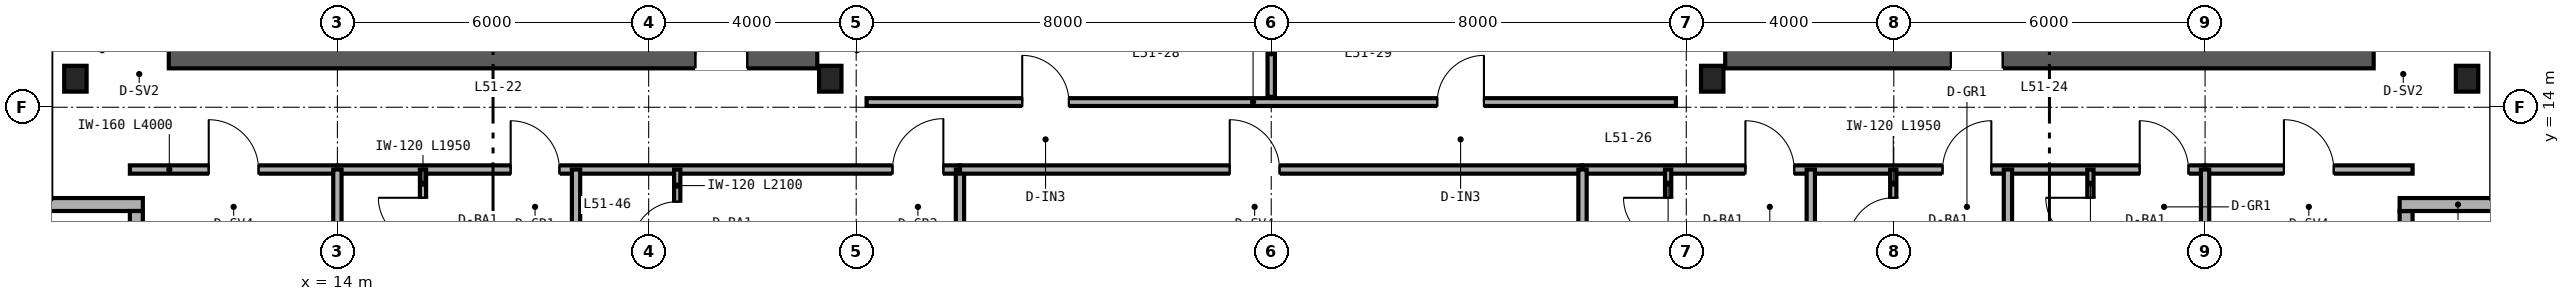
"""IFC4 building model, lengths in metres.
Left out: names, types, materials, properties, quantities, classifications, styles, units other than length and angle.
Written with IfcOpenShell. Run it as: python <this file> out.ifc"""

import sys

from ifc_helpers import new_model, si_unit, direction, frame, frame_2d, origin, origin_2d, place, context, subcontext, project, spatial, rectangle, i_section, extrude, source, transform, mapped, element, fill, save


model = new_model("IFC4")
c1 = context("Model", 3, precision=1e-05, world=origin(), true_north=direction((0.0, 1.0)))
c2 = subcontext(c1, "Body", "Model", "MODEL_VIEW")
j1 = project(units=[si_unit("LENGTHUNIT", "METRE"), si_unit("PLANEANGLEUNIT", "RADIAN")], contexts=[c1])
p1 = place(None, origin())
s1 = spatial("IfcSite", under=j1, at=p1, CompositionType="ELEMENT")
p2 = place(p1, origin())
s2 = spatial("IfcBuilding", under=s1, at=p2, CompositionType="ELEMENT")
p3 = place(p2, frame((0.0, 0.0, 202.8)))
s3 = spatial("IfcBuildingStorey", under=s2, at=p3, CompositionType="ELEMENT", Elevation=202.8)
p4 = place(p3, frame((10.75, 15.0, 0.0), z_axis=(0.0, 0.0, 1.0), x_axis=(1.0, 0.0, 0.0)))
e1 = element("IfcWall", 1, at=p4, inside=s3, PredefinedType="SHEAR", context=c2, shape_type="SweptSolid", body=[
    extrude(rectangle(XDim=12.5, YDim=0.5, at=frame_2d((6.25, 0.0))), origin(), (0.0, 0.0, 1.0), 3.37),
])
p5 = place(p4, frame((10.15, 0.0, 0.0)))
e2 = element("IfcOpeningElement", 2, at=p5, cuts=e1, PredefinedType="OPENING", context=c2, shape_type="SweptSolid", body=[
    extrude(rectangle(XDim=1.0, YDim=2.15, at=frame_2d((0.5, 1.075))), frame((0.0, 0.26, 0.0), z_axis=(0.0, -1.0, 0.0), x_axis=(1.0, 0.0, 0.0)), (0.0, 0.0, 1.0), 0.52),
])
p6 = place(p3, frame((40.75, 15.0, 0.0), z_axis=(0.0, 0.0, 1.0), x_axis=(1.0, 0.0, 0.0)))
e3 = element("IfcWall", 3, at=p6, inside=s3, PredefinedType="SHEAR", context=c2, shape_type="SweptSolid", body=[
    extrude(rectangle(XDim=12.5, YDim=0.5, at=frame_2d((6.25, 0.0))), origin(), (0.0, 0.0, 1.0), 3.37),
])
p7 = place(p6, frame((4.35, 0.0, 0.0)))
e4 = element("IfcOpeningElement", 4, at=p7, cuts=e3, PredefinedType="OPENING", context=c2, shape_type="SweptSolid", body=[
    extrude(rectangle(XDim=1.0, YDim=2.15, at=frame_2d((0.5, 1.075))), frame((0.0, 0.26, 0.0), z_axis=(0.0, -1.0, 0.0), x_axis=(1.0, 0.0, 0.0)), (0.0, 0.0, 1.0), 0.52),
])
m1 = source(origin(), c2, "Body", "SweptSolid", [
    extrude(i_section(OverallWidth=0.432, OverallDepth=0.498, WebThickness=0.056, FlangeThickness=0.089, FilletRadius=0.025, at=origin_2d()), origin(), (0.0, 0.0, 1.0), 3.37),
])
for number, where, z_axis, x_axis in (
    (5, (8.95, 14.55, 0.0), (0.0, 0.0, 1.0), (1.0, 0.0, 0.0)),
    (6, (23.5, 14.55, 0.0), (0.0, 0.0, 1.0), (1.0, 0.0, 0.0)),
    (7, (40.5, 14.55, 0.0), (0.0, 0.0, 1.0), (1.0, 0.0, 0.0)),
    (8, (55.05, 14.55, 0.0), (0.0, 0.0, 1.0), (1.0, 0.0, 0.0)),
):
    element("IfcColumn", number, at=place(p3, frame(where, z_axis=z_axis, x_axis=x_axis)), inside=s3, PredefinedType="COLUMN", context=c2, shape_type="MappedRepresentation", body=[
        mapped(m1, transform((0.0, 0.0, 0.0), scale=1.0)),
    ])
p8 = place(p3, frame((53.875, 10.0, 0.0), z_axis=(0.0, 0.0, 1.0), x_axis=(0.0, 1.0, 0.0)))
e9 = element("IfcWall", 9, at=p8, inside=s3, PredefinedType="SOLIDWALL", context=c2, shape_type="SweptSolid", body=[
    extrude(rectangle(XDim=2.0, YDim=0.25, at=frame_2d((1.0, 0.0))), origin(), (0.0, 0.0, 1.0), 3.37),
])
for number, where, z_axis, x_axis in (
    (10, (53.75, 12.125, 0.0), (0.0, 0.0, 1.0), (1.0, 0.0, 0.0)),
    (11, (8.0, 12.125, 0.0), (0.0, 0.0, 1.0), (1.0, 0.0, 0.0)),
):
    element("IfcWall", number, at=place(p3, frame(where, z_axis=z_axis, x_axis=x_axis)), inside=s3, PredefinedType="SOLIDWALL", context=c2, shape_type="SweptSolid", body=[
        extrude(rectangle(XDim=2.25, YDim=0.25, at=frame_2d((1.125, 0.0))), origin(), (0.0, 0.0, 1.0), 3.37),
    ])
p9 = place(p3, frame((10.125, 12.0, 0.0), z_axis=(0.0, 0.0, 1.0), x_axis=(0.0, -1.0, 0.0)))
e12 = element("IfcWall", 12, at=p9, inside=s3, PredefinedType="SOLIDWALL", context=c2, shape_type="SweptSolid", body=[
    extrude(rectangle(XDim=2.0, YDim=0.25, at=frame_2d((1.0, 0.0))), origin(), (0.0, 0.0, 1.0), 3.37),
])
p10 = place(p3, frame((24.2, 14.1, 0.0), z_axis=(0.0, 0.0, 1.0), x_axis=(1.0, 0.0, 0.0)))
e13 = element("IfcWall", 13, at=p10, inside=s3, PredefinedType="PARTITIONING", context=c2, shape_type="SweptSolid", body=[
    extrude(rectangle(XDim=15.6, YDim=0.15, at=frame_2d((7.8, 0.0))), origin(), (0.0, 0.0, 1.0), 3.37),
])
p11 = place(p10, frame((3.0, 0.0, 0.0)))
e14 = element("IfcOpeningElement", 14, at=p11, cuts=e13, PredefinedType="OPENING", context=c2, shape_type="SweptSolid", body=[
    extrude(rectangle(XDim=0.9, YDim=2.15, at=frame_2d((0.45, 1.075))), frame((0.0, 0.085, 0.0), z_axis=(0.0, -1.0, 0.0), x_axis=(1.0, 0.0, 0.0)), (0.0, 0.0, 1.0), 0.17),
])
p12 = place(p10, frame((11.0, 0.0, 0.0)))
e15 = element("IfcOpeningElement", 15, at=p12, cuts=e13, PredefinedType="OPENING", context=c2, shape_type="SweptSolid", body=[
    extrude(rectangle(XDim=0.9, YDim=2.15, at=frame_2d((0.45, 1.075))), frame((0.0, 0.085, 0.0), z_axis=(0.0, -1.0, 0.0), x_axis=(1.0, 0.0, 0.0)), (0.0, 0.0, 1.0), 0.17),
])
p13 = place(p3, frame((32.0, 14.2, 0.0), z_axis=(0.0, 0.0, 1.0), x_axis=(0.0, 1.0, 0.0)))
e16 = element("IfcWall", 16, at=p13, inside=s3, PredefinedType="PARTITIONING", context=c2, shape_type="SweptSolid", body=[
    extrude(rectangle(XDim=1.68, YDim=0.142, at=frame_2d((0.84, 0.0))), origin(), (0.0, 0.0, 1.0), 3.37),
])
p14 = place(p3, frame((10.0, 12.8, 0.0), z_axis=(0.0, 0.0, 1.0), x_axis=(1.0, 0.0, 0.0)))
e17 = element("IfcWall", 17, at=p14, inside=s3, PredefinedType="PARTITIONING", context=c2, shape_type="SweptSolid", body=[
    extrude(rectangle(XDim=4.0, YDim=0.16, at=frame_2d((2.0, 0.0))), origin(), (0.0, 0.0, 1.0), 3.37),
])
p15 = place(p14, frame((1.52, 0.0, 0.0)))
e18 = element("IfcOpeningElement", 18, at=p15, cuts=e17, PredefinedType="OPENING", context=c2, shape_type="SweptSolid", body=[
    extrude(rectangle(XDim=0.96, YDim=2.15, at=frame_2d((0.48, 1.075))), frame((0.0, 0.09, 0.0), z_axis=(0.0, -1.0, 0.0), x_axis=(1.0, 0.0, 0.0)), (0.0, 0.0, 1.0), 0.18),
])
p16 = place(p3, frame((50.0, 12.8, 0.0), z_axis=(0.0, 0.0, 1.0), x_axis=(1.0, 0.0, 0.0)))
e19 = element("IfcWall", 19, at=p16, inside=s3, PredefinedType="PARTITIONING", context=c2, shape_type="SweptSolid", body=[
    extrude(rectangle(XDim=4.0, YDim=0.16, at=frame_2d((2.0, 0.0))), origin(), (0.0, 0.0, 1.0), 3.37),
])
p17 = place(p16, frame((1.52, 0.0, 0.0)))
e20 = element("IfcOpeningElement", 20, at=p17, cuts=e19, PredefinedType="OPENING", context=c2, shape_type="SweptSolid", body=[
    extrude(rectangle(XDim=0.96, YDim=2.15, at=frame_2d((0.48, 1.075))), frame((0.0, 0.09, 0.0), z_axis=(0.0, -1.0, 0.0), x_axis=(1.0, 0.0, 0.0)), (0.0, 0.0, 1.0), 0.18),
])
p18 = place(p3, frame((14.0, 12.8, 0.0), z_axis=(0.0, 0.0, 1.0), x_axis=(1.0, 0.0, 0.0)))
e21 = element("IfcWall", 21, at=p18, inside=s3, PredefinedType="PARTITIONING", context=c2, shape_type="SweptSolid", body=[
    extrude(rectangle(XDim=12.0, YDim=0.16, at=frame_2d((6.0, 0.0))), origin(), (0.0, 0.0, 1.0), 2.913),
])
p19 = place(p18, frame((3.34, 0.0, 0.0)))
e22 = element("IfcOpeningElement", 22, at=p19, cuts=e21, PredefinedType="OPENING", context=c2, shape_type="SweptSolid", body=[
    extrude(rectangle(XDim=0.94, YDim=2.15, at=frame_2d((0.47, 1.075))), frame((0.0, 0.09, 0.0), z_axis=(0.0, -1.0, 0.0), x_axis=(1.0, 0.0, 0.0)), (0.0, 0.0, 1.0), 0.18),
])
p20 = place(p18, frame((10.7, 0.0, 0.0)))
e23 = element("IfcOpeningElement", 23, at=p20, cuts=e21, PredefinedType="OPENING", context=c2, shape_type="SweptSolid", body=[
    extrude(rectangle(XDim=0.98, YDim=2.2, at=frame_2d((0.49, 1.1))), frame((0.0, 0.09, 0.0), z_axis=(0.0, -1.0, 0.0), x_axis=(1.0, 0.0, 0.0)), (0.0, 0.0, 1.0), 0.18),
])
p21 = place(p3, frame((14.0, 6.36, 0.0), z_axis=(0.0, 0.0, 1.0), x_axis=(0.0, 1.0, 0.0)))
e24 = element("IfcWall", 24, at=p21, inside=s3, PredefinedType="PARTITIONING", context=c2, shape_type="SweptSolid", body=[
    extrude(rectangle(XDim=6.44, YDim=0.16, at=frame_2d((3.22, 0.0))), origin(), (0.0, 0.0, 1.0), 2.677),
])
p22 = place(p3, frame((26.0, 6.36, 0.0), z_axis=(0.0, 0.0, 1.0), x_axis=(0.0, 1.0, 0.0)))
e25 = element("IfcWall", 25, at=p22, inside=s3, PredefinedType="PARTITIONING", context=c2, shape_type="SweptSolid", body=[
    extrude(rectangle(XDim=6.44, YDim=0.16, at=frame_2d((3.22, 0.0))), origin(), (0.0, 0.0, 1.0), 2.443),
])
p23 = place(p3, frame((18.6, 6.36, 0.0), z_axis=(0.0, 0.0, 1.0), x_axis=(0.0, 1.0, 0.0)))
e26 = element("IfcWall", 26, at=p23, inside=s3, PredefinedType="PARTITIONING", context=c2, shape_type="SweptSolid", body=[
    extrude(rectangle(XDim=6.44, YDim=0.16, at=frame_2d((3.22, 0.0))), origin(), (0.0, 0.0, 1.0), 2.677),
])
p24 = place(p3, frame((15.65, 10.85, 0.0), z_axis=(0.0, 0.0, 1.0), x_axis=(0.0, 1.0, 0.0)))
e27 = element("IfcWall", 27, at=p24, inside=s3, PredefinedType="PARTITIONING", context=c2, shape_type="SweptSolid", body=[
    extrude(rectangle(XDim=1.95, YDim=0.12, at=frame_2d((0.975, 0.0))), origin(), (0.0, 0.0, 1.0), 3.37),
])
p25 = place(p24, frame((0.545, 0.0, 0.0)))
e28 = element("IfcOpeningElement", 28, at=p25, cuts=e27, PredefinedType="OPENING", context=c2, shape_type="SweptSolid", body=[
    extrude(rectangle(XDim=0.86, YDim=2.1, at=frame_2d((0.43, 1.05))), frame((0.0, 0.07, 0.0), z_axis=(0.0, -1.0, 0.0), x_axis=(1.0, 0.0, 0.0)), (0.0, 0.0, 1.0), 0.14),
])
p26 = place(p3, frame((20.55, 10.7, 0.0), z_axis=(0.0, 0.0, 1.0), x_axis=(0.0, 1.0, 0.0)))
e29 = element("IfcWall", 29, at=p26, inside=s3, PredefinedType="PARTITIONING", context=c2, shape_type="SweptSolid", body=[
    extrude(rectangle(XDim=2.1, YDim=0.12, at=frame_2d((1.05, 0.0))), origin(), (0.0, 0.0, 1.0), 3.37),
])
p27 = place(p26, frame((0.62, 0.0, 0.0)))
e30 = element("IfcOpeningElement", 30, at=p27, cuts=e29, PredefinedType="OPENING", context=c2, shape_type="SweptSolid", body=[
    extrude(rectangle(XDim=0.86, YDim=2.1, at=frame_2d((0.43, 1.05))), frame((0.0, 0.07, 0.0), z_axis=(0.0, -1.0, 0.0), x_axis=(1.0, 0.0, 0.0)), (0.0, 0.0, 1.0), 0.14),
])
p28 = place(p3, frame((26.0, 12.8, 0.0), z_axis=(0.0, 0.0, 1.0), x_axis=(1.0, 0.0, 0.0)))
e31 = element("IfcWall", 31, at=p28, inside=s3, PredefinedType="PARTITIONING", context=c2, shape_type="SweptSolid", body=[
    extrude(rectangle(XDim=12.0, YDim=0.16, at=frame_2d((6.0, 0.0))), origin(), (0.0, 0.0, 1.0), 3.37),
])
p29 = place(p28, frame((5.2, 0.0, 0.0)))
e32 = element("IfcOpeningElement", 32, at=p29, cuts=e31, PredefinedType="OPENING", context=c2, shape_type="SweptSolid", body=[
    extrude(rectangle(XDim=0.96, YDim=2.15, at=frame_2d((0.48, 1.075))), frame((0.0, 0.09, 0.0), z_axis=(0.0, -1.0, 0.0), x_axis=(1.0, 0.0, 0.0)), (0.0, 0.0, 1.0), 0.18),
])
p30 = place(p3, frame((38.0, 12.8, 0.0), z_axis=(0.0, 0.0, 1.0), x_axis=(1.0, 0.0, 0.0)))
e33 = element("IfcWall", 33, at=p30, inside=s3, PredefinedType="PARTITIONING", context=c2, shape_type="SweptSolid", body=[
    extrude(rectangle(XDim=12.0, YDim=0.16, at=frame_2d((6.0, 0.0))), origin(), (0.0, 0.0, 1.0), 2.913),
])
p31 = place(p30, frame((3.14, 0.0, 0.0)))
e34 = element("IfcOpeningElement", 34, at=p31, cuts=e33, PredefinedType="OPENING", context=c2, shape_type="SweptSolid", body=[
    extrude(rectangle(XDim=0.94, YDim=2.15, at=frame_2d((0.47, 1.075))), frame((0.0, 0.09, 0.0), z_axis=(0.0, -1.0, 0.0), x_axis=(1.0, 0.0, 0.0)), (0.0, 0.0, 1.0), 0.18),
])
p32 = place(p30, frame((6.94, 0.0, 0.0)))
e35 = element("IfcOpeningElement", 35, at=p32, cuts=e33, PredefinedType="OPENING", context=c2, shape_type="SweptSolid", body=[
    extrude(rectangle(XDim=0.94, YDim=2.15, at=frame_2d((0.47, 1.075))), frame((0.0, 0.09, 0.0), z_axis=(0.0, -1.0, 0.0), x_axis=(1.0, 0.0, 0.0)), (0.0, 0.0, 1.0), 0.18),
])
p33 = place(p30, frame((10.74, 0.0, 0.0)))
e36 = element("IfcOpeningElement", 36, at=p33, cuts=e33, PredefinedType="OPENING", context=c2, shape_type="SweptSolid", body=[
    extrude(rectangle(XDim=0.94, YDim=2.15, at=frame_2d((0.47, 1.075))), frame((0.0, 0.09, 0.0), z_axis=(0.0, -1.0, 0.0), x_axis=(1.0, 0.0, 0.0)), (0.0, 0.0, 1.0), 0.18),
])
p34 = place(p3, frame((38.0, 6.36, 0.0), z_axis=(0.0, 0.0, 1.0), x_axis=(0.0, 1.0, 0.0)))
e37 = element("IfcWall", 37, at=p34, inside=s3, PredefinedType="PARTITIONING", context=c2, shape_type="SweptSolid", body=[
    extrude(rectangle(XDim=6.44, YDim=0.16, at=frame_2d((3.22, 0.0))), origin(), (0.0, 0.0, 1.0), 2.443),
])
p35 = place(p3, frame((50.0, 6.36, 0.0), z_axis=(0.0, 0.0, 1.0), x_axis=(0.0, 1.0, 0.0)))
e38 = element("IfcWall", 38, at=p35, inside=s3, PredefinedType="PARTITIONING", context=c2, shape_type="SweptSolid", body=[
    extrude(rectangle(XDim=6.44, YDim=0.16, at=frame_2d((3.22, 0.0))), origin(), (0.0, 0.0, 1.0), 2.677),
])
p36 = place(p3, frame((42.4, 6.36, 0.0), z_axis=(0.0, 0.0, 1.0), x_axis=(0.0, 1.0, 0.0)))
e39 = element("IfcWall", 39, at=p36, inside=s3, PredefinedType="PARTITIONING", context=c2, shape_type="SweptSolid", body=[
    extrude(rectangle(XDim=6.44, YDim=0.16, at=frame_2d((3.22, 0.0))), origin(), (0.0, 0.0, 1.0), 2.833),
])
p37 = place(p3, frame((39.65, 10.85, 0.0), z_axis=(0.0, 0.0, 1.0), x_axis=(0.0, 1.0, 0.0)))
e40 = element("IfcWall", 40, at=p37, inside=s3, PredefinedType="PARTITIONING", context=c2, shape_type="SweptSolid", body=[
    extrude(rectangle(XDim=1.95, YDim=0.12, at=frame_2d((0.975, 0.0))), origin(), (0.0, 0.0, 1.0), 3.37),
])
p38 = place(p37, frame((0.545, 0.0, 0.0)))
e41 = element("IfcOpeningElement", 41, at=p38, cuts=e40, PredefinedType="OPENING", context=c2, shape_type="SweptSolid", body=[
    extrude(rectangle(XDim=0.86, YDim=2.1, at=frame_2d((0.43, 1.05))), frame((0.0, 0.07, 0.0), z_axis=(0.0, -1.0, 0.0), x_axis=(1.0, 0.0, 0.0)), (0.0, 0.0, 1.0), 0.14),
])
p39 = place(p3, frame((46.2, 6.36, 0.0), z_axis=(0.0, 0.0, 1.0), x_axis=(0.0, 1.0, 0.0)))
e42 = element("IfcWall", 42, at=p39, inside=s3, PredefinedType="PARTITIONING", context=c2, shape_type="SweptSolid", body=[
    extrude(rectangle(XDim=6.44, YDim=0.16, at=frame_2d((3.22, 0.0))), origin(), (0.0, 0.0, 1.0), 2.677),
])
p40 = place(p3, frame((43.99, 10.85, 0.0), z_axis=(0.0, 0.0, 1.0), x_axis=(0.0, 1.0, 0.0)))
e43 = element("IfcWall", 43, at=p40, inside=s3, PredefinedType="PARTITIONING", context=c2, shape_type="SweptSolid", body=[
    extrude(rectangle(XDim=1.95, YDim=0.12, at=frame_2d((0.975, 0.0))), origin(), (0.0, 0.0, 1.0), 3.37),
])
p41 = place(p40, frame((0.545, 0.0, 0.0)))
e44 = element("IfcOpeningElement", 44, at=p41, cuts=e43, PredefinedType="OPENING", context=c2, shape_type="SweptSolid", body=[
    extrude(rectangle(XDim=0.86, YDim=2.1, at=frame_2d((0.43, 1.05))), frame((0.0, 0.07, 0.0), z_axis=(0.0, -1.0, 0.0), x_axis=(1.0, 0.0, 0.0)), (0.0, 0.0, 1.0), 0.14),
])
p42 = place(p3, frame((47.79, 10.85, 0.0), z_axis=(0.0, 0.0, 1.0), x_axis=(0.0, 1.0, 0.0)))
e45 = element("IfcWall", 45, at=p42, inside=s3, PredefinedType="PARTITIONING", context=c2, shape_type="SweptSolid", body=[
    extrude(rectangle(XDim=1.95, YDim=0.12, at=frame_2d((0.975, 0.0))), origin(), (0.0, 0.0, 1.0), 3.37),
])
p43 = place(p42, frame((0.545, 0.0, 0.0)))
e46 = element("IfcOpeningElement", 46, at=p43, cuts=e45, PredefinedType="OPENING", context=c2, shape_type="SweptSolid", body=[
    extrude(rectangle(XDim=0.86, YDim=2.1, at=frame_2d((0.43, 1.05))), frame((0.0, 0.07, 0.0), z_axis=(0.0, -1.0, 0.0), x_axis=(1.0, 0.0, 0.0)), (0.0, 0.0, 1.0), 0.14),
])
m2 = source(origin(), c2, "Body", "SweptSolid", [
    extrude(rectangle(XDim=1.0, YDim=2.15, at=frame_2d((0.5, 1.075))), frame((0.0, 0.025, 0.0), z_axis=(0.0, -1.0, 0.0), x_axis=(1.0, 0.0, 0.0)), (0.0, 0.0, 1.0), 0.05),
])
p44 = place(p5, origin())
e47 = element("IfcDoor", 47, at=p44, inside=s3, OperationType="SINGLE_SWING_LEFT", PredefinedType="DOOR", context=c2, shape_type="MappedRepresentation", body=[
    mapped(m2, transform((0.0, 0.0, 0.0), scale=1.0)),
])
fill(e2, e47)
p45 = place(p7, origin())
e48 = element("IfcDoor", 48, at=p45, inside=s3, OperationType="SINGLE_SWING_RIGHT", PredefinedType="DOOR", context=c2, shape_type="MappedRepresentation", body=[
    mapped(m2, transform((0.0, 0.0, 0.0), scale=1.0)),
])
fill(e4, e48)
m3 = source(origin(), c2, "Body", "SweptSolid", [
    extrude(rectangle(XDim=0.9, YDim=2.15, at=frame_2d((0.45, 1.075))), frame((0.0, 0.025, 0.0), z_axis=(0.0, -1.0, 0.0), x_axis=(1.0, 0.0, 0.0)), (0.0, 0.0, 1.0), 0.05),
])
p46 = place(p11, origin())
e49 = element("IfcDoor", 49, at=p46, inside=s3, OperationType="SINGLE_SWING_LEFT", PredefinedType="DOOR", context=c2, shape_type="MappedRepresentation", body=[
    mapped(m3, transform((0.0, 0.0, 0.0), scale=1.0)),
])
fill(e14, e49)
p47 = place(p12, origin())
e50 = element("IfcDoor", 50, at=p47, inside=s3, OperationType="SINGLE_SWING_RIGHT", PredefinedType="DOOR", context=c2, shape_type="MappedRepresentation", body=[
    mapped(m3, transform((0.0, 0.0, 0.0), scale=1.0)),
])
fill(e15, e50)
m4 = source(origin(), c2, "Body", "SweptSolid", [
    extrude(rectangle(XDim=0.96, YDim=2.15, at=frame_2d((0.48, 1.075))), frame((0.0, 0.025, 0.0), z_axis=(0.0, -1.0, 0.0), x_axis=(1.0, 0.0, 0.0)), (0.0, 0.0, 1.0), 0.05),
])
p48 = place(p15, origin())
e51 = element("IfcDoor", 51, at=p48, inside=s3, OperationType="SINGLE_SWING_LEFT", PredefinedType="DOOR", context=c2, shape_type="MappedRepresentation", body=[
    mapped(m4, transform((0.0, 0.0, 0.0), scale=1.0)),
])
fill(e18, e51)
p49 = place(p17, origin())
e52 = element("IfcDoor", 52, at=p49, inside=s3, OperationType="SINGLE_SWING_LEFT", PredefinedType="DOOR", context=c2, shape_type="MappedRepresentation", body=[
    mapped(m4, transform((0.0, 0.0, 0.0), scale=1.0)),
])
fill(e20, e52)
m5 = source(origin(), c2, "Body", "SweptSolid", [
    extrude(rectangle(XDim=0.86, YDim=2.1, at=frame_2d((0.43, 1.05))), frame((0.0, 0.025, 0.0), z_axis=(0.0, -1.0, 0.0), x_axis=(1.0, 0.0, 0.0)), (0.0, 0.0, 1.0), 0.05),
])
p50 = place(p25, origin())
e53 = element("IfcDoor", 53, at=p50, inside=s3, OperationType="SINGLE_SWING_RIGHT", PredefinedType="DOOR", context=c2, shape_type="MappedRepresentation", body=[
    mapped(m5, transform((0.0, 0.0, 0.0), scale=1.0)),
])
fill(e28, e53)
p51 = place(p27, origin())
e54 = element("IfcDoor", 54, at=p51, inside=s3, OperationType="SINGLE_SWING_LEFT", PredefinedType="DOOR", context=c2, shape_type="MappedRepresentation", body=[
    mapped(m5, transform((0.0, 0.0, 0.0), scale=1.0)),
])
fill(e30, e54)
m6 = source(origin(), c2, "Body", "SweptSolid", [
    extrude(rectangle(XDim=0.94, YDim=2.15, at=frame_2d((0.47, 1.075))), frame((0.0, 0.025, 0.0), z_axis=(0.0, -1.0, 0.0), x_axis=(1.0, 0.0, 0.0)), (0.0, 0.0, 1.0), 0.05),
])
p52 = place(p19, origin())
e55 = element("IfcDoor", 55, at=p52, inside=s3, OperationType="SINGLE_SWING_LEFT", PredefinedType="DOOR", context=c2, shape_type="MappedRepresentation", body=[
    mapped(m6, transform((0.0, 0.0, 0.0), scale=1.0)),
])
fill(e22, e55)
m7 = source(origin(), c2, "Body", "SweptSolid", [
    extrude(rectangle(XDim=0.98, YDim=2.2, at=frame_2d((0.49, 1.1))), frame((0.0, 0.025, 0.0), z_axis=(0.0, -1.0, 0.0), x_axis=(1.0, 0.0, 0.0)), (0.0, 0.0, 1.0), 0.05),
])
p53 = place(p20, origin())
e56 = element("IfcDoor", 56, at=p53, inside=s3, OperationType="SINGLE_SWING_RIGHT", PredefinedType="DOOR", context=c2, shape_type="MappedRepresentation", body=[
    mapped(m7, transform((0.0, 0.0, 0.0), scale=1.0)),
])
fill(e23, e56)
p54 = place(p29, origin())
e57 = element("IfcDoor", 57, at=p54, inside=s3, OperationType="SINGLE_SWING_LEFT", PredefinedType="DOOR", context=c2, shape_type="MappedRepresentation", body=[
    mapped(m4, transform((0.0, 0.0, 0.0), scale=1.0)),
])
fill(e32, e57)
p55 = place(p38, origin())
e58 = element("IfcDoor", 58, at=p55, inside=s3, OperationType="SINGLE_SWING_RIGHT", PredefinedType="DOOR", context=c2, shape_type="MappedRepresentation", body=[
    mapped(m5, transform((0.0, 0.0, 0.0), scale=1.0)),
])
fill(e41, e58)
p56 = place(p41, origin())
e59 = element("IfcDoor", 59, at=p56, inside=s3, OperationType="SINGLE_SWING_LEFT", PredefinedType="DOOR", context=c2, shape_type="MappedRepresentation", body=[
    mapped(m5, transform((0.0, 0.0, 0.0), scale=1.0)),
])
fill(e44, e59)
p57 = place(p43, origin())
e60 = element("IfcDoor", 60, at=p57, inside=s3, OperationType="SINGLE_SWING_RIGHT", PredefinedType="DOOR", context=c2, shape_type="MappedRepresentation", body=[
    mapped(m5, transform((0.0, 0.0, 0.0), scale=1.0)),
])
fill(e46, e60)
p58 = place(p31, origin())
e61 = element("IfcDoor", 61, at=p58, inside=s3, OperationType="SINGLE_SWING_LEFT", PredefinedType="DOOR", context=c2, shape_type="MappedRepresentation", body=[
    mapped(m6, transform((0.0, 0.0, 0.0), scale=1.0)),
])
fill(e34, e61)
p59 = place(p32, origin())
e62 = element("IfcDoor", 62, at=p59, inside=s3, OperationType="SINGLE_SWING_RIGHT", PredefinedType="DOOR", context=c2, shape_type="MappedRepresentation", body=[
    mapped(m6, transform((0.0, 0.0, 0.0), scale=1.0)),
])
fill(e35, e62)
p60 = place(p33, origin())
e63 = element("IfcDoor", 63, at=p60, inside=s3, OperationType="SINGLE_SWING_LEFT", PredefinedType="DOOR", context=c2, shape_type="MappedRepresentation", body=[
    mapped(m6, transform((0.0, 0.0, 0.0), scale=1.0)),
])
fill(e36, e63)
save(model, sys.argv[1])
